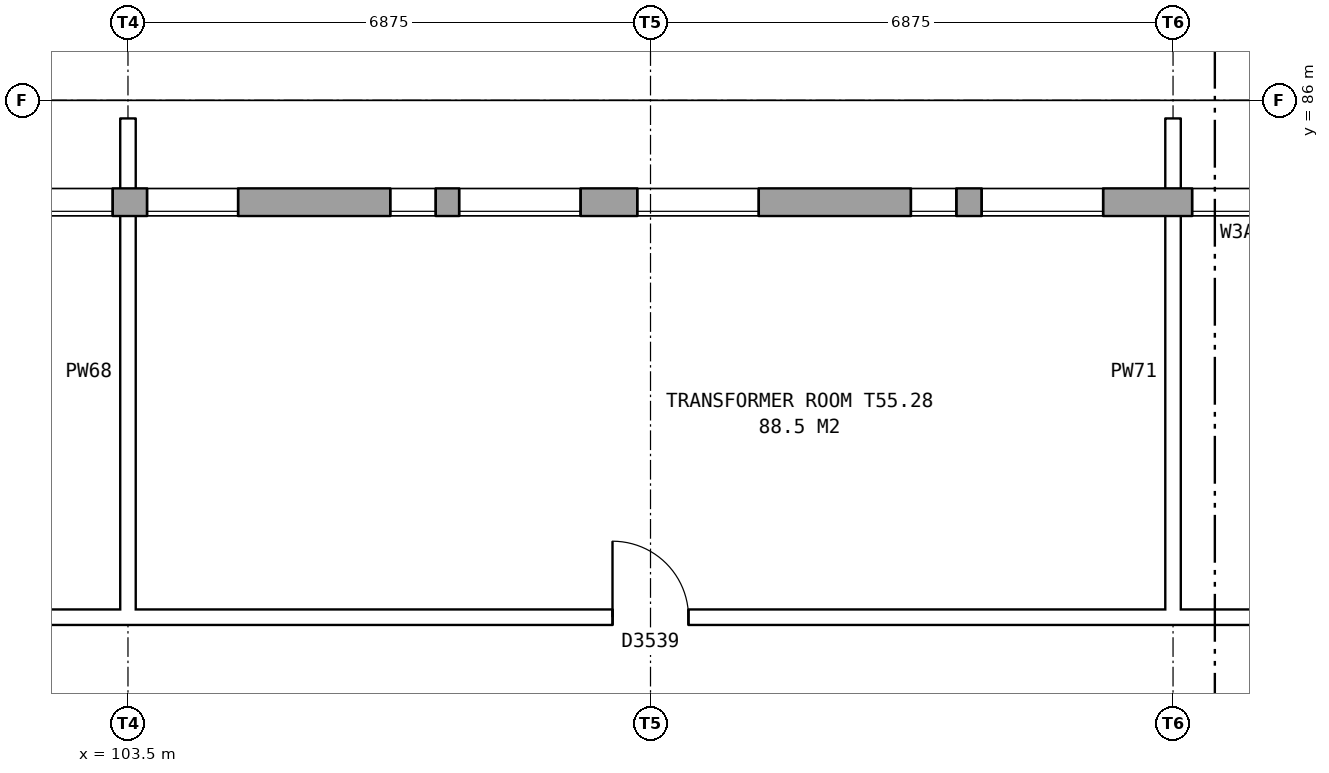
"""IFC4 building model, lengths in metres.
Left out: names, types, materials, properties, quantities, classifications, styles, units other than length and angle.
Written with IfcOpenShell. Run it as: python <this file> out.ifc"""

import sys

from ifc_helpers import new_model, si_unit, direction, frame, frame_2d, origin, place, context, subcontext, project, spatial, rectangle, extrude, element, fill, save


model = new_model("IFC4")
c1 = context("Model", 3, precision=1e-05, world=origin(), true_north=direction((0.0, 1.0)))
c2 = subcontext(c1, "Body", "Model", "MODEL_VIEW")
j1 = project(units=[si_unit("LENGTHUNIT", "METRE"), si_unit("PLANEANGLEUNIT", "RADIAN")], contexts=[c1])
p1 = place(None, origin())
s1 = spatial("IfcSite", under=j1, at=p1, CompositionType="ELEMENT")
p2 = place(p1, origin())
s2 = spatial("IfcBuilding", under=s1, at=p2, CompositionType="ELEMENT")
p3 = place(p2, frame((0.0, 0.0, 194.4)))
s3 = spatial("IfcBuildingStorey", under=s2, at=p3, CompositionType="ELEMENT", Elevation=194.4)
p4 = place(p3, frame((130.85, 84.66, 0.0), z_axis=(0.0, 0.0, 1.0), x_axis=(-1.0, 0.0, 0.0)))
e1 = element("IfcWall", 1, at=p4, inside=s3, PredefinedType="STANDARD", context=c2, shape_type="SweptSolid", body=[
    extrude(rectangle(XDim=54.7, YDim=0.36, at=frame_2d((27.35, 0.0))), origin(), (0.0, 0.0, 1.0), 3.95),
])
p5 = place(p4, frame((0.769, 0.0, 1.5)))
e2 = element("IfcOpeningElement", 2, at=p5, cuts=e1, PredefinedType="OPENING", context=c2, shape_type="SweptSolid", body=[
    extrude(rectangle(XDim=1.6, YDim=1.2, at=frame_2d((0.8, 0.6))), frame((0.0, 0.19, 0.0), z_axis=(0.0, -1.0, 0.0), x_axis=(1.0, 0.0, 0.0)), (0.0, 0.0, 1.0), 0.38),
])
p6 = place(p4, frame((2.7, 0.0, 1.5)))
e3 = element("IfcOpeningElement", 3, at=p6, cuts=e1, PredefinedType="OPENING", context=c2, shape_type="SweptSolid", body=[
    extrude(rectangle(XDim=0.6, YDim=1.2, at=frame_2d((0.3, 0.6))), frame((0.0, 0.19, 0.0), z_axis=(0.0, -1.0, 0.0), x_axis=(1.0, 0.0, 0.0)), (0.0, 0.0, 1.0), 0.38),
])
p7 = place(p4, frame((7.644, 0.0, 1.5)))
e4 = element("IfcOpeningElement", 4, at=p7, cuts=e1, PredefinedType="OPENING", context=c2, shape_type="SweptSolid", body=[
    extrude(rectangle(XDim=1.6, YDim=1.2, at=frame_2d((0.8, 0.6))), frame((0.0, 0.19, 0.0), z_axis=(0.0, -1.0, 0.0), x_axis=(1.0, 0.0, 0.0)), (0.0, 0.0, 1.0), 0.38),
])
p8 = place(p4, frame((5.3, 0.0, 1.5)))
e5 = element("IfcOpeningElement", 5, at=p8, cuts=e1, PredefinedType="OPENING", context=c2, shape_type="SweptSolid", body=[
    extrude(rectangle(XDim=1.6, YDim=1.2, at=frame_2d((0.8, 0.6))), frame((0.0, 0.19, 0.0), z_axis=(0.0, -1.0, 0.0), x_axis=(1.0, 0.0, 0.0)), (0.0, 0.0, 1.0), 0.38),
])
p9 = place(p4, frame((14.519, 0.0, 1.5)))
e6 = element("IfcOpeningElement", 6, at=p9, cuts=e1, PredefinedType="OPENING", context=c2, shape_type="SweptSolid", body=[
    extrude(rectangle(XDim=1.6, YDim=1.2, at=frame_2d((0.8, 0.6))), frame((0.0, 0.19, 0.0), z_axis=(0.0, -1.0, 0.0), x_axis=(1.0, 0.0, 0.0)), (0.0, 0.0, 1.0), 0.38),
])
p10 = place(p4, frame((16.45, 0.0, 1.5)))
e7 = element("IfcOpeningElement", 7, at=p10, cuts=e1, PredefinedType="OPENING", context=c2, shape_type="SweptSolid", body=[
    extrude(rectangle(XDim=0.6, YDim=1.2, at=frame_2d((0.3, 0.6))), frame((0.0, 0.19, 0.0), z_axis=(0.0, -1.0, 0.0), x_axis=(1.0, 0.0, 0.0)), (0.0, 0.0, 1.0), 0.38),
])
p11 = place(p4, frame((21.394, 0.0, 1.5)))
e8 = element("IfcOpeningElement", 8, at=p11, cuts=e1, PredefinedType="OPENING", context=c2, shape_type="SweptSolid", body=[
    extrude(rectangle(XDim=1.6, YDim=1.2, at=frame_2d((0.8, 0.6))), frame((0.0, 0.19, 0.0), z_axis=(0.0, -1.0, 0.0), x_axis=(1.0, 0.0, 0.0)), (0.0, 0.0, 1.0), 0.38),
])
p12 = place(p4, frame((19.05, 0.0, 1.5)))
e9 = element("IfcOpeningElement", 9, at=p12, cuts=e1, PredefinedType="OPENING", context=c2, shape_type="SweptSolid", body=[
    extrude(rectangle(XDim=1.6, YDim=1.2, at=frame_2d((0.8, 0.6))), frame((0.0, 0.19, 0.0), z_axis=(0.0, -1.0, 0.0), x_axis=(1.0, 0.0, 0.0)), (0.0, 0.0, 1.0), 0.38),
])
p13 = place(p4, frame((27.55, 0.0, 1.5)))
e10 = element("IfcOpeningElement", 10, at=p13, cuts=e1, PredefinedType="OPENING", context=c2, shape_type="SweptSolid", body=[
    extrude(rectangle(XDim=1.2, YDim=1.2, at=frame_2d((0.6, 0.6))), frame((0.0, 0.19, 0.0), z_axis=(0.0, -1.0, 0.0), x_axis=(1.0, 0.0, 0.0)), (0.0, 0.0, 1.0), 0.38),
])
p14 = place(p4, frame((31.706, 0.0, 1.5)))
e11 = element("IfcOpeningElement", 11, at=p14, cuts=e1, PredefinedType="OPENING", context=c2, shape_type="SweptSolid", body=[
    extrude(rectangle(XDim=1.6, YDim=1.2, at=frame_2d((0.8, 0.6))), frame((0.0, 0.19, 0.0), z_axis=(0.0, -1.0, 0.0), x_axis=(1.0, 0.0, 0.0)), (0.0, 0.0, 1.0), 0.38),
])
p15 = place(p4, frame((30.65, 0.0, 1.5)))
e12 = element("IfcOpeningElement", 12, at=p15, cuts=e1, PredefinedType="OPENING", context=c2, shape_type="SweptSolid", body=[
    extrude(rectangle(XDim=0.6, YDim=1.2, at=frame_2d((0.3, 0.6))), frame((0.0, 0.19, 0.0), z_axis=(0.0, -1.0, 0.0), x_axis=(1.0, 0.0, 0.0)), (0.0, 0.0, 1.0), 0.38),
])
p16 = place(p4, frame((38.581, 0.0, 1.5)))
e13 = element("IfcOpeningElement", 13, at=p16, cuts=e1, PredefinedType="OPENING", context=c2, shape_type="SweptSolid", body=[
    extrude(rectangle(XDim=1.6, YDim=1.2, at=frame_2d((0.8, 0.6))), frame((0.0, 0.19, 0.0), z_axis=(0.0, -1.0, 0.0), x_axis=(1.0, 0.0, 0.0)), (0.0, 0.0, 1.0), 0.38),
])
p17 = place(p4, frame((41.3, 0.0, 1.5)))
e14 = element("IfcOpeningElement", 14, at=p17, cuts=e1, PredefinedType="OPENING", context=c2, shape_type="SweptSolid", body=[
    extrude(rectangle(XDim=1.2, YDim=1.2, at=frame_2d((0.6, 0.6))), frame((0.0, 0.19, 0.0), z_axis=(0.0, -1.0, 0.0), x_axis=(1.0, 0.0, 0.0)), (0.0, 0.0, 1.0), 0.38),
])
p18 = place(p4, frame((45.456, 0.0, 1.5)))
e15 = element("IfcOpeningElement", 15, at=p18, cuts=e1, PredefinedType="OPENING", context=c2, shape_type="SweptSolid", body=[
    extrude(rectangle(XDim=1.6, YDim=1.2, at=frame_2d((0.8, 0.6))), frame((0.0, 0.19, 0.0), z_axis=(0.0, -1.0, 0.0), x_axis=(1.0, 0.0, 0.0)), (0.0, 0.0, 1.0), 0.38),
])
p19 = place(p4, frame((44.4, 0.0, 1.5)))
e16 = element("IfcOpeningElement", 16, at=p19, cuts=e1, PredefinedType="OPENING", context=c2, shape_type="SweptSolid", body=[
    extrude(rectangle(XDim=0.6, YDim=1.2, at=frame_2d((0.3, 0.6))), frame((0.0, 0.19, 0.0), z_axis=(0.0, -1.0, 0.0), x_axis=(1.0, 0.0, 0.0)), (0.0, 0.0, 1.0), 0.38),
])
p20 = place(p4, frame((52.331, 0.0, 1.5)))
e17 = element("IfcOpeningElement", 17, at=p20, cuts=e1, PredefinedType="OPENING", context=c2, shape_type="SweptSolid", body=[
    extrude(rectangle(XDim=1.6, YDim=1.2, at=frame_2d((0.8, 0.6))), frame((0.0, 0.19, 0.0), z_axis=(0.0, -1.0, 0.0), x_axis=(1.0, 0.0, 0.0)), (0.0, 0.0, 1.0), 0.38),
])
p21 = place(p4, frame((9.55, 0.0, 1.5)))
e18 = element("IfcOpeningElement", 18, at=p21, cuts=e1, PredefinedType="OPENING", context=c2, shape_type="SweptSolid", body=[
    extrude(rectangle(XDim=0.6, YDim=1.2, at=frame_2d((0.3, 0.6))), frame((0.0, 0.19, 0.0), z_axis=(0.0, -1.0, 0.0), x_axis=(1.0, 0.0, 0.0)), (0.0, 0.0, 1.0), 0.38),
])
p22 = place(p4, frame((12.15, 0.0, 1.5)))
e19 = element("IfcOpeningElement", 19, at=p22, cuts=e1, PredefinedType="OPENING", context=c2, shape_type="SweptSolid", body=[
    extrude(rectangle(XDim=1.2, YDim=1.2, at=frame_2d((0.6, 0.6))), frame((0.0, 0.19, 0.0), z_axis=(0.0, -1.0, 0.0), x_axis=(1.0, 0.0, 0.0)), (0.0, 0.0, 1.0), 0.38),
])
p23 = place(p4, frame((23.3, 0.0, 1.5)))
e20 = element("IfcOpeningElement", 20, at=p23, cuts=e1, PredefinedType="OPENING", context=c2, shape_type="SweptSolid", body=[
    extrude(rectangle(XDim=0.6, YDim=1.2, at=frame_2d((0.3, 0.6))), frame((0.0, 0.19, 0.0), z_axis=(0.0, -1.0, 0.0), x_axis=(1.0, 0.0, 0.0)), (0.0, 0.0, 1.0), 0.38),
])
p24 = place(p4, frame((25.9, 0.0, 1.5)))
e21 = element("IfcOpeningElement", 21, at=p24, cuts=e1, PredefinedType="OPENING", context=c2, shape_type="SweptSolid", body=[
    extrude(rectangle(XDim=1.2, YDim=1.2, at=frame_2d((0.6, 0.6))), frame((0.0, 0.19, 0.0), z_axis=(0.0, -1.0, 0.0), x_axis=(1.0, 0.0, 0.0)), (0.0, 0.0, 1.0), 0.38),
])
p25 = place(p4, frame((33.65, 0.0, 1.5)))
e22 = element("IfcOpeningElement", 22, at=p25, cuts=e1, PredefinedType="OPENING", context=c2, shape_type="SweptSolid", body=[
    extrude(rectangle(XDim=1.6, YDim=1.2, at=frame_2d((0.8, 0.6))), frame((0.0, 0.19, 0.0), z_axis=(0.0, -1.0, 0.0), x_axis=(1.0, 0.0, 0.0)), (0.0, 0.0, 1.0), 0.38),
])
p26 = place(p4, frame((37.5, 0.0, 1.5)))
e23 = element("IfcOpeningElement", 23, at=p26, cuts=e1, PredefinedType="OPENING", context=c2, shape_type="SweptSolid", body=[
    extrude(rectangle(XDim=0.6, YDim=1.2, at=frame_2d((0.3, 0.6))), frame((0.0, 0.19, 0.0), z_axis=(0.0, -1.0, 0.0), x_axis=(1.0, 0.0, 0.0)), (0.0, 0.0, 1.0), 0.38),
])
p27 = place(p4, frame((47.4, 0.0, 1.5)))
e24 = element("IfcOpeningElement", 24, at=p27, cuts=e1, PredefinedType="OPENING", context=c2, shape_type="SweptSolid", body=[
    extrude(rectangle(XDim=1.6, YDim=1.2, at=frame_2d((0.8, 0.6))), frame((0.0, 0.19, 0.0), z_axis=(0.0, -1.0, 0.0), x_axis=(1.0, 0.0, 0.0)), (0.0, 0.0, 1.0), 0.38),
])
p28 = place(p4, frame((51.25, 0.0, 1.5)))
e25 = element("IfcOpeningElement", 25, at=p28, cuts=e1, PredefinedType="OPENING", context=c2, shape_type="SweptSolid", body=[
    extrude(rectangle(XDim=0.6, YDim=1.2, at=frame_2d((0.3, 0.6))), frame((0.0, 0.19, 0.0), z_axis=(0.0, -1.0, 0.0), x_axis=(1.0, 0.0, 0.0)), (0.0, 0.0, 1.0), 0.38),
])
p29 = place(p3, frame((103.4, 79.2, 0.0), z_axis=(0.0, 0.0, 1.0), x_axis=(1.0, 0.0, 0.0)))
e26 = element("IfcWall", 26, at=p29, inside=s3, PredefinedType="PARTITIONING", context=c2, shape_type="SweptSolid", body=[
    extrude(rectangle(XDim=65.36, YDim=0.2, at=frame_2d((32.68, 0.0))), origin(), (0.0, 0.0, 1.0), 3.95),
])
p30 = place(p29, frame((6.475, 0.0, 0.0)))
e27 = element("IfcOpeningElement", 27, at=p30, cuts=e26, PredefinedType="OPENING", context=c2, shape_type="SweptSolid", body=[
    extrude(rectangle(XDim=1.0, YDim=2.1, at=frame_2d((0.5, 1.05))), frame((0.0, 0.11, 0.0), z_axis=(0.0, -1.0, 0.0), x_axis=(1.0, 0.0, 0.0)), (0.0, 0.0, 1.0), 0.22),
])
p31 = place(p29, frame((20.405, 0.0, 0.0)))
e28 = element("IfcOpeningElement", 28, at=p31, cuts=e26, PredefinedType="OPENING", context=c2, shape_type="SweptSolid", body=[
    extrude(rectangle(XDim=1.0, YDim=2.1, at=frame_2d((0.5, 1.05))), frame((0.0, 0.11, 0.0), z_axis=(0.0, -1.0, 0.0), x_axis=(1.0, 0.0, 0.0)), (0.0, 0.0, 1.0), 0.22),
])
p32 = place(p29, frame((33.28, 0.0, 0.0)))
e29 = element("IfcOpeningElement", 29, at=p32, cuts=e26, PredefinedType="OPENING", context=c2, shape_type="SweptSolid", body=[
    extrude(rectangle(XDim=1.0, YDim=2.1, at=frame_2d((0.5, 1.05))), frame((0.0, 0.11, 0.0), z_axis=(0.0, -1.0, 0.0), x_axis=(1.0, 0.0, 0.0)), (0.0, 0.0, 1.0), 0.22),
])
p33 = place(p29, frame((45.1, 0.0, 0.0)))
e30 = element("IfcOpeningElement", 30, at=p33, cuts=e26, PredefinedType="OPENING", context=c2, shape_type="SweptSolid", body=[
    extrude(rectangle(XDim=1.0, YDim=2.1, at=frame_2d((0.5, 1.05))), frame((0.0, 0.11, 0.0), z_axis=(0.0, -1.0, 0.0), x_axis=(1.0, 0.0, 0.0)), (0.0, 0.0, 1.0), 0.22),
])
p34 = place(p29, frame((57.92, 0.0, 0.0)))
e31 = element("IfcOpeningElement", 31, at=p34, cuts=e26, PredefinedType="OPENING", context=c2, shape_type="SweptSolid", body=[
    extrude(rectangle(XDim=1.0, YDim=2.1, at=frame_2d((0.5, 1.05))), frame((0.0, 0.11, 0.0), z_axis=(0.0, -1.0, 0.0), x_axis=(1.0, 0.0, 0.0)), (0.0, 0.0, 1.0), 0.22),
])
p35 = place(p3, frame((89.65, 79.2, 0.0), z_axis=(0.0, 0.0, 1.0), x_axis=(1.0, 0.0, 0.0)))
e32 = element("IfcWall", 32, at=p35, inside=s3, PredefinedType="PARTITIONING", context=c2, shape_type="SweptSolid", body=[
    extrude(rectangle(XDim=13.95, YDim=0.2, at=frame_2d((6.975, 0.0))), origin(), (0.0, 0.0, 1.0), 3.95),
])
p36 = place(p35, frame((6.475, 0.0, 0.0)))
e33 = element("IfcOpeningElement", 33, at=p36, cuts=e32, PredefinedType="OPENING", context=c2, shape_type="SweptSolid", body=[
    extrude(rectangle(XDim=1.0, YDim=2.1, at=frame_2d((0.5, 1.05))), frame((0.0, 0.11, 0.0), z_axis=(0.0, -1.0, 0.0), x_axis=(1.0, 0.0, 0.0)), (0.0, 0.0, 1.0), 0.22),
])
for number, where, z_axis, x_axis in (
    (34, (103.5, 79.1, 0.0), (0.0, 0.0, 1.0), (0.0, 1.0, 0.0)),
    (35, (117.25, 79.1, 0.0), (0.0, 0.0, 1.0), (0.0, 1.0, 0.0)),
):
    element("IfcWall", number, at=place(p3, frame(where, z_axis=z_axis, x_axis=x_axis)), inside=s3, PredefinedType="PARTITIONING", context=c2, shape_type="SweptSolid", body=[
        extrude(rectangle(XDim=6.66, YDim=0.2, at=frame_2d((3.33, 0.0))), origin(), (0.0, 0.0, 1.0), 3.417),
    ])
p37 = place(p9, origin())
e36 = element("IfcWindow", 36, at=p37, inside=s3, PartitioningType="DOUBLE_PANEL_HORIZONTAL", PredefinedType="WINDOW", context=c2, shape_type="SweptSolid", body=[
    extrude(rectangle(XDim=1.6, YDim=1.2, at=frame_2d((0.8, 0.6))), frame((0.0, 0.15, 0.0), z_axis=(0.0, -1.0, 0.0), x_axis=(1.0, 0.0, 0.0)), (0.0, 0.0, 1.0), 0.06),
])
fill(e6, e36)
p38 = place(p10, origin())
e37 = element("IfcWindow", 37, at=p38, inside=s3, PartitioningType="DOUBLE_PANEL_HORIZONTAL", PredefinedType="WINDOW", context=c2, shape_type="SweptSolid", body=[
    extrude(rectangle(XDim=0.6, YDim=1.2, at=frame_2d((0.3, 0.6))), frame((0.0, 0.15, 0.0), z_axis=(0.0, -1.0, 0.0), x_axis=(1.0, 0.0, 0.0)), (0.0, 0.0, 1.0), 0.06),
])
fill(e7, e37)
p39 = place(p11, origin())
e38 = element("IfcWindow", 38, at=p39, inside=s3, PartitioningType="DOUBLE_PANEL_HORIZONTAL", PredefinedType="WINDOW", context=c2, shape_type="SweptSolid", body=[
    extrude(rectangle(XDim=1.6, YDim=1.2, at=frame_2d((0.8, 0.6))), frame((0.0, 0.15, 0.0), z_axis=(0.0, -1.0, 0.0), x_axis=(1.0, 0.0, 0.0)), (0.0, 0.0, 1.0), 0.06),
])
fill(e8, e38)
p40 = place(p12, origin())
e39 = element("IfcWindow", 39, at=p40, inside=s3, PartitioningType="DOUBLE_PANEL_HORIZONTAL", PredefinedType="WINDOW", context=c2, shape_type="SweptSolid", body=[
    extrude(rectangle(XDim=1.6, YDim=1.2, at=frame_2d((0.8, 0.6))), frame((0.0, 0.15, 0.0), z_axis=(0.0, -1.0, 0.0), x_axis=(1.0, 0.0, 0.0)), (0.0, 0.0, 1.0), 0.06),
])
fill(e9, e39)
p41 = place(p13, origin())
e40 = element("IfcWindow", 40, at=p41, inside=s3, PartitioningType="DOUBLE_PANEL_HORIZONTAL", PredefinedType="WINDOW", context=c2, shape_type="SweptSolid", body=[
    extrude(rectangle(XDim=1.2, YDim=1.2, at=frame_2d((0.6, 0.6))), frame((0.0, 0.15, 0.0), z_axis=(0.0, -1.0, 0.0), x_axis=(1.0, 0.0, 0.0)), (0.0, 0.0, 1.0), 0.06),
])
fill(e10, e40)
p42 = place(p30, origin())
e41 = element("IfcDoor", 41, at=p42, inside=s3, OperationType="SINGLE_SWING_LEFT", PredefinedType="DOOR", context=c2, shape_type="SweptSolid", body=[
    extrude(rectangle(XDim=1.0, YDim=2.1, at=frame_2d((0.5, 1.05))), frame((0.0, 0.025, 0.0), z_axis=(0.0, -1.0, 0.0), x_axis=(1.0, 0.0, 0.0)), (0.0, 0.0, 1.0), 0.05),
])
fill(e27, e41)
p43 = place(p22, origin())
e42 = element("IfcWindow", 42, at=p43, inside=s3, PartitioningType="DOUBLE_PANEL_HORIZONTAL", PredefinedType="WINDOW", context=c2, shape_type="SweptSolid", body=[
    extrude(rectangle(XDim=1.2, YDim=1.2, at=frame_2d((0.6, 0.6))), frame((0.0, 0.15, 0.0), z_axis=(0.0, -1.0, 0.0), x_axis=(1.0, 0.0, 0.0)), (0.0, 0.0, 1.0), 0.06),
])
fill(e19, e42)
p44 = place(p23, origin())
e43 = element("IfcWindow", 43, at=p44, inside=s3, PartitioningType="DOUBLE_PANEL_HORIZONTAL", PredefinedType="WINDOW", context=c2, shape_type="SweptSolid", body=[
    extrude(rectangle(XDim=0.6, YDim=1.2, at=frame_2d((0.3, 0.6))), frame((0.0, 0.15, 0.0), z_axis=(0.0, -1.0, 0.0), x_axis=(1.0, 0.0, 0.0)), (0.0, 0.0, 1.0), 0.06),
])
fill(e20, e43)
p45 = place(p24, origin())
e44 = element("IfcWindow", 44, at=p45, inside=s3, PartitioningType="DOUBLE_PANEL_HORIZONTAL", PredefinedType="WINDOW", context=c2, shape_type="SweptSolid", body=[
    extrude(rectangle(XDim=1.2, YDim=1.2, at=frame_2d((0.6, 0.6))), frame((0.0, 0.15, 0.0), z_axis=(0.0, -1.0, 0.0), x_axis=(1.0, 0.0, 0.0)), (0.0, 0.0, 1.0), 0.06),
])
fill(e21, e44)
save(model, sys.argv[1])
